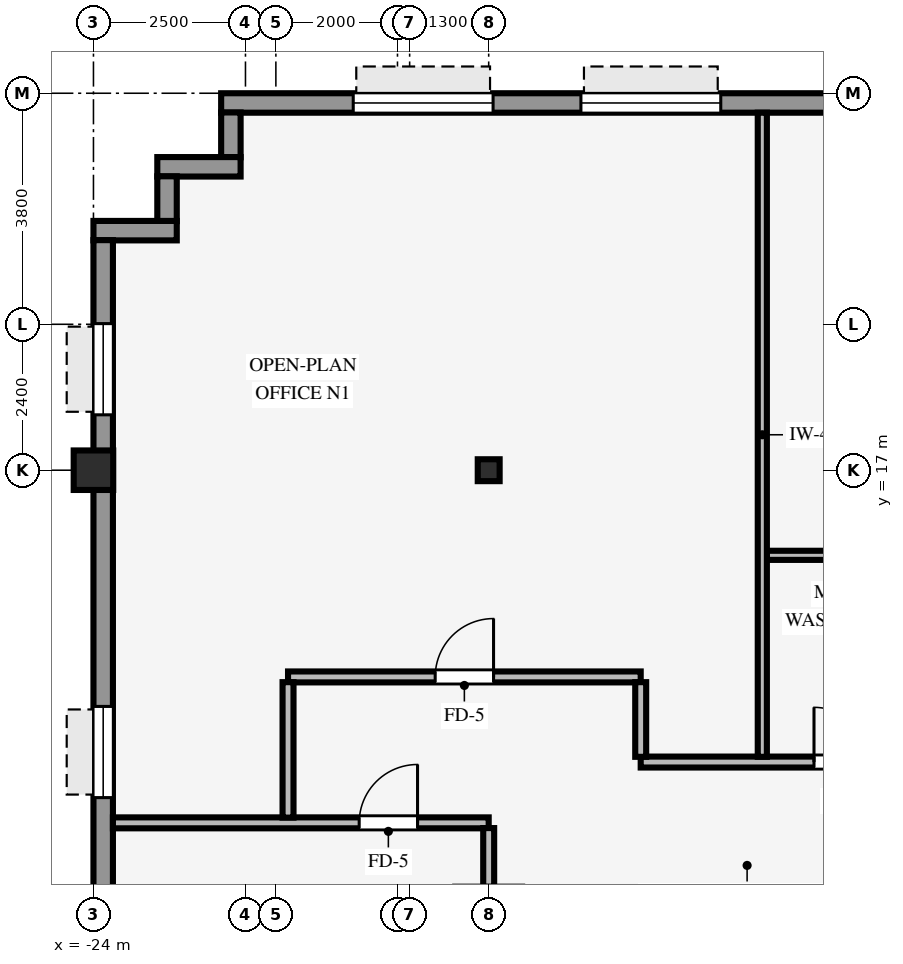
"""IFC4 building model, lengths in metres.
Left out: names, types, materials, properties, quantities, classifications, styles, units other than length and angle.
Written with IfcOpenShell. Run it as: python <this file> out.ifc"""

import sys

from ifc_helpers import new_model, si_unit, direction, frame, frame_2d, origin, origin_2d, place, context, subcontext, project, spatial, rectangle, hollow_rectangle, i_section, extrude, source, transform, mapped, element, fill, save


model = new_model("IFC4")
c1 = context("Model", 3, precision=1e-05, world=origin(), true_north=direction((0.0, 1.0)))
c2 = subcontext(c1, "Body", "Model", "MODEL_VIEW")
j1 = project(units=[si_unit("LENGTHUNIT", "METRE"), si_unit("PLANEANGLEUNIT", "RADIAN")], contexts=[c1])
p1 = place(None, origin())
s1 = spatial("IfcSite", under=j1, at=p1, CompositionType="ELEMENT")
p2 = place(p1, origin())
s2 = spatial("IfcBuilding", under=s1, at=p2, CompositionType="ELEMENT")
p3 = place(p2, frame((0.0, 0.0, 105.6)))
s3 = spatial("IfcBuildingStorey", under=s2, at=p3, CompositionType="ELEMENT", Elevation=105.6)
p4 = place(p3, frame((-24.0, 17.0, 0.0), z_axis=(0.0, 0.0, 1.0), x_axis=(1.0, 0.0, 0.0)))
e1 = element("IfcColumn", 1, at=p4, inside=s3, PredefinedType="COLUMN", context=c2, shape_type="SweptSolid", body=[
    extrude(hollow_rectangle(XDim=0.65, YDim=0.65, WallThickness=0.04, InnerFilletRadius=0.04, OuterFilletRadius=0.08, at=origin_2d()), origin(), (0.0, 0.0, 1.0), 3.37),
])
p5 = place(p3, frame((-17.5, 17.0, 0.0), z_axis=(0.0, 0.0, 1.0), x_axis=(1.0, 0.0, 0.0)))
e2 = element("IfcColumn", 2, at=p5, inside=s3, PredefinedType="COLUMN", context=c2, shape_type="SweptSolid", body=[
    extrude(i_section(OverallWidth=0.36, OverallDepth=0.36, WebThickness=0.021, FlangeThickness=0.021, FilletRadius=0.018, at=origin_2d()), origin(), (0.0, 0.0, 1.0), 3.37),
])
p6 = place(p3, frame((-21.9, 23.04, 0.0), z_axis=(0.0, 0.0, 1.0), x_axis=(1.0, 0.0, 0.0)))
e3 = element("IfcWall", 3, at=p6, inside=s3, PredefinedType="STANDARD", context=c2, shape_type="SweptSolid", body=[
    extrude(rectangle(XDim=43.8, YDim=0.32, at=frame_2d((21.9, 0.0))), origin(), (0.0, 0.0, 1.0), 2.705),
])
p7 = place(p6, frame((26.85, 0.0, 0.0)))
e4 = element("IfcOpeningElement", 4, at=p7, cuts=e3, PredefinedType="OPENING", context=c2, shape_type="SweptSolid", body=[
    extrude(rectangle(XDim=1.05, YDim=2.1, at=frame_2d((0.525, 1.05))), frame((0.0, 0.17, 0.0), z_axis=(0.0, -1.0, 0.0), x_axis=(1.0, 0.0, 0.0)), (0.0, 0.0, 1.0), 0.34),
])
p8 = place(p6, frame((2.172, 0.0, 0.8)))
e5 = element("IfcOpeningElement", 5, at=p8, cuts=e3, PredefinedType="OPENING", context=c2, shape_type="SweptSolid", body=[
    extrude(rectangle(XDim=2.3, YDim=1.62, at=frame_2d((1.15, 0.81))), frame((0.0, 0.17, 0.0), z_axis=(0.0, -1.0, 0.0), x_axis=(1.0, 0.0, 0.0)), (0.0, 0.0, 1.0), 0.34),
])
p9 = place(p6, frame((5.917, 0.0, 0.8)))
e6 = element("IfcOpeningElement", 6, at=p9, cuts=e3, PredefinedType="OPENING", context=c2, shape_type="SweptSolid", body=[
    extrude(rectangle(XDim=2.3, YDim=1.62, at=frame_2d((1.15, 0.81))), frame((0.0, 0.17, 0.0), z_axis=(0.0, -1.0, 0.0), x_axis=(1.0, 0.0, 0.0)), (0.0, 0.0, 1.0), 0.34),
])
p10 = place(p6, frame((16.106, 0.0, 0.8)))
e7 = element("IfcOpeningElement", 7, at=p10, cuts=e3, PredefinedType="OPENING", context=c2, shape_type="SweptSolid", body=[
    extrude(rectangle(XDim=2.3, YDim=1.62, at=frame_2d((1.15, 0.81))), frame((0.0, 0.17, 0.0), z_axis=(0.0, -1.0, 0.0), x_axis=(1.0, 0.0, 0.0)), (0.0, 0.0, 1.0), 0.34),
])
p11 = place(p6, frame((34.683, 0.0, 0.8)))
e8 = element("IfcOpeningElement", 8, at=p11, cuts=e3, PredefinedType="OPENING", context=c2, shape_type="SweptSolid", body=[
    extrude(rectangle(XDim=2.3, YDim=1.62, at=frame_2d((1.15, 0.81))), frame((0.0, 0.17, 0.0), z_axis=(0.0, -1.0, 0.0), x_axis=(1.0, 0.0, 0.0)), (0.0, 0.0, 1.0), 0.34),
])
p12 = place(p6, frame((39.328, 0.0, 0.8)))
e9 = element("IfcOpeningElement", 9, at=p12, cuts=e3, PredefinedType="OPENING", context=c2, shape_type="SweptSolid", body=[
    extrude(rectangle(XDim=2.3, YDim=1.62, at=frame_2d((1.15, 0.81))), frame((0.0, 0.17, 0.0), z_axis=(0.0, -1.0, 0.0), x_axis=(1.0, 0.0, 0.0)), (0.0, 0.0, 1.0), 0.34),
])
p13 = place(p3, frame((-21.74, 22.146, 0.0), z_axis=(0.0, 0.0, 1.0), x_axis=(0.0, 1.0, 0.0)))
e10 = element("IfcWall", 10, at=p13, inside=s3, PredefinedType="STANDARD", context=c2, shape_type="SweptSolid", body=[
    extrude(rectangle(XDim=0.738, YDim=0.32, at=frame_2d((0.369, 0.0))), origin(), (0.0, 0.0, 1.0), 3.36),
])
p14 = place(p3, frame((-22.95, 21.99, 0.0), z_axis=(0.0, 0.0, 1.0), x_axis=(1.0, 0.0, 0.0)))
e11 = element("IfcWall", 11, at=p14, inside=s3, PredefinedType="STANDARD", context=c2, shape_type="SweptSolid", body=[
    extrude(rectangle(XDim=1.37, YDim=0.32, at=frame_2d((0.685, 0.0))), origin(), (0.0, 0.0, 1.0), 3.36),
])
p15 = place(p3, frame((-22.79, 21.096, 0.0), z_axis=(0.0, 0.0, 1.0), x_axis=(0.0, 1.0, 0.0)))
e12 = element("IfcWall", 12, at=p15, inside=s3, PredefinedType="STANDARD", context=c2, shape_type="SweptSolid", body=[
    extrude(rectangle(XDim=0.738, YDim=0.32, at=frame_2d((0.369, 0.0))), origin(), (0.0, 0.0, 1.0), 3.36),
])
p16 = place(p3, frame((-24.0, 20.94, 0.0), z_axis=(0.0, 0.0, 1.0), x_axis=(1.0, 0.0, 0.0)))
e13 = element("IfcWall", 13, at=p16, inside=s3, PredefinedType="STANDARD", context=c2, shape_type="SweptSolid", body=[
    extrude(rectangle(XDim=1.37, YDim=0.32, at=frame_2d((0.685, 0.0))), origin(), (0.0, 0.0, 1.0), 3.36),
])
p17 = place(p3, frame((-23.84, -20.784, 0.0), z_axis=(0.0, 0.0, 1.0), x_axis=(0.0, 1.0, 0.0)))
e14 = element("IfcWall", 14, at=p17, inside=s3, PredefinedType="STANDARD", context=c2, shape_type="SweptSolid", body=[
    extrude(rectangle(XDim=41.568, YDim=0.32, at=frame_2d((20.784, 0.0))), origin(), (0.0, 0.0, 1.0), 2.705),
])
p18 = place(p17, frame((1.373, 0.0, 0.8)))
e15 = element("IfcOpeningElement", 15, at=p18, cuts=e14, PredefinedType="OPENING", context=c2, shape_type="SweptSolid", body=[
    extrude(rectangle(XDim=1.5, YDim=1.6, at=frame_2d((0.75, 0.8))), frame((0.0, 0.17, 0.0), z_axis=(0.0, -1.0, 0.0), x_axis=(1.0, 0.0, 0.0)), (0.0, 0.0, 1.0), 0.34),
])
p19 = place(p17, frame((7.669, 0.0, 0.8)))
e16 = element("IfcOpeningElement", 16, at=p19, cuts=e14, PredefinedType="OPENING", context=c2, shape_type="SweptSolid", body=[
    extrude(rectangle(XDim=1.5, YDim=1.6, at=frame_2d((0.75, 0.8))), frame((0.0, 0.17, 0.0), z_axis=(0.0, -1.0, 0.0), x_axis=(1.0, 0.0, 0.0)), (0.0, 0.0, 1.0), 0.34),
])
p20 = place(p17, frame((12.615, 0.0, 0.8)))
e17 = element("IfcOpeningElement", 17, at=p20, cuts=e14, PredefinedType="OPENING", context=c2, shape_type="SweptSolid", body=[
    extrude(rectangle(XDim=1.5, YDim=1.6, at=frame_2d((0.75, 0.8))), frame((0.0, 0.17, 0.0), z_axis=(0.0, -1.0, 0.0), x_axis=(1.0, 0.0, 0.0)), (0.0, 0.0, 1.0), 0.34),
])
p21 = place(p17, frame((17.561, 0.0, 0.8)))
e18 = element("IfcOpeningElement", 18, at=p21, cuts=e14, PredefinedType="OPENING", context=c2, shape_type="SweptSolid", body=[
    extrude(rectangle(XDim=1.5, YDim=1.6, at=frame_2d((0.75, 0.8))), frame((0.0, 0.17, 0.0), z_axis=(0.0, -1.0, 0.0), x_axis=(1.0, 0.0, 0.0)), (0.0, 0.0, 1.0), 0.34),
])
p22 = place(p17, frame((22.507, 0.0, 0.8)))
e19 = element("IfcOpeningElement", 19, at=p22, cuts=e14, PredefinedType="OPENING", context=c2, shape_type="SweptSolid", body=[
    extrude(rectangle(XDim=1.5, YDim=1.6, at=frame_2d((0.75, 0.8))), frame((0.0, 0.17, 0.0), z_axis=(0.0, -1.0, 0.0), x_axis=(1.0, 0.0, 0.0)), (0.0, 0.0, 1.0), 0.34),
])
p23 = place(p17, frame((27.453, 0.0, 0.8)))
e20 = element("IfcOpeningElement", 20, at=p23, cuts=e14, PredefinedType="OPENING", context=c2, shape_type="SweptSolid", body=[
    extrude(rectangle(XDim=1.5, YDim=1.6, at=frame_2d((0.75, 0.8))), frame((0.0, 0.17, 0.0), z_axis=(0.0, -1.0, 0.0), x_axis=(1.0, 0.0, 0.0)), (0.0, 0.0, 1.0), 0.34),
])
p24 = place(p17, frame((32.399, 0.0, 0.8)))
e21 = element("IfcOpeningElement", 21, at=p24, cuts=e14, PredefinedType="OPENING", context=c2, shape_type="SweptSolid", body=[
    extrude(rectangle(XDim=1.5, YDim=1.6, at=frame_2d((0.75, 0.8))), frame((0.0, 0.17, 0.0), z_axis=(0.0, -1.0, 0.0), x_axis=(1.0, 0.0, 0.0)), (0.0, 0.0, 1.0), 0.34),
])
p25 = place(p17, frame((38.695, 0.0, 0.8)))
e22 = element("IfcOpeningElement", 22, at=p25, cuts=e14, PredefinedType="OPENING", context=c2, shape_type="SweptSolid", body=[
    extrude(rectangle(XDim=1.5, YDim=1.6, at=frame_2d((0.75, 0.8))), frame((0.0, 0.17, 0.0), z_axis=(0.0, -1.0, 0.0), x_axis=(1.0, 0.0, 0.0)), (0.0, 0.0, 1.0), 0.34),
])
p26 = place(p3, frame((-23.68, 11.2, 0.0), z_axis=(0.0, 0.0, 1.0), x_axis=(1.0, 0.0, 0.0)))
e23 = element("IfcWall", 23, at=p26, inside=s3, PredefinedType="PARTITIONING", context=c2, shape_type="SweptSolid", body=[
    extrude(rectangle(XDim=6.18, YDim=0.18, at=frame_2d((3.09, 0.0))), origin(), (0.0, 0.0, 1.0), 3.36),
])
p27 = place(p26, frame((4.05, 0.0, 0.0)))
e24 = element("IfcOpeningElement", 24, at=p27, cuts=e23, PredefinedType="OPENING", context=c2, shape_type="SweptSolid", body=[
    extrude(rectangle(XDim=0.96, YDim=2.1, at=frame_2d((0.48, 1.05))), frame((0.0, 0.1, 0.0), z_axis=(0.0, -1.0, 0.0), x_axis=(1.0, 0.0, 0.0)), (0.0, 0.0, 1.0), 0.2),
])
p28 = place(p3, frame((-15.0, 12.2, 0.0), z_axis=(0.0, 0.0, 1.0), x_axis=(1.0, 0.0, 0.0)))
e25 = element("IfcWall", 25, at=p28, inside=s3, PredefinedType="PARTITIONING", context=c2, shape_type="SweptSolid", body=[
    extrude(rectangle(XDim=30.0, YDim=0.18, at=frame_2d((15.0, 0.0))), origin(), (0.0, 0.0, 1.0), 3.36),
])
p29 = place(p28, frame((23.02, 0.0, 0.0)))
e26 = element("IfcOpeningElement", 26, at=p29, cuts=e25, PredefinedType="OPENING", context=c2, shape_type="SweptSolid", body=[
    extrude(rectangle(XDim=0.96, YDim=2.1, at=frame_2d((0.48, 1.05))), frame((0.0, 0.1, 0.0), z_axis=(0.0, -1.0, 0.0), x_axis=(1.0, 0.0, 0.0)), (0.0, 0.0, 1.0), 0.2),
])
p30 = place(p28, frame((16.45, 0.0, 0.0)))
e27 = element("IfcOpeningElement", 27, at=p30, cuts=e25, PredefinedType="OPENING", context=c2, shape_type="SweptSolid", body=[
    extrude(rectangle(XDim=0.96, YDim=2.1, at=frame_2d((0.48, 1.05))), frame((0.0, 0.1, 0.0), z_axis=(0.0, -1.0, 0.0), x_axis=(1.0, 0.0, 0.0)), (0.0, 0.0, 1.0), 0.2),
])
p31 = place(p28, frame((5.45, 0.0, 0.0)))
e28 = element("IfcOpeningElement", 28, at=p31, cuts=e25, PredefinedType="OPENING", context=c2, shape_type="SweptSolid", body=[
    extrude(rectangle(XDim=0.9, YDim=2.1, at=frame_2d((0.45, 1.05))), frame((0.0, 0.1, 0.0), z_axis=(0.0, -1.0, 0.0), x_axis=(1.0, 0.0, 0.0)), (0.0, 0.0, 1.0), 0.2),
])
p32 = place(p28, frame((2.85, 0.0, 0.0)))
e29 = element("IfcOpeningElement", 29, at=p32, cuts=e25, PredefinedType="OPENING", context=c2, shape_type="SweptSolid", body=[
    extrude(rectangle(XDim=0.9, YDim=2.1, at=frame_2d((0.45, 1.05))), frame((0.0, 0.1, 0.0), z_axis=(0.0, -1.0, 0.0), x_axis=(1.0, 0.0, 0.0)), (0.0, 0.0, 1.0), 0.2),
])
p33 = place(p28, frame((12.52, 0.0, 0.0)))
e30 = element("IfcOpeningElement", 30, at=p33, cuts=e25, PredefinedType="OPENING", context=c2, shape_type="SweptSolid", body=[
    extrude(rectangle(XDim=0.96, YDim=2.1, at=frame_2d((0.48, 1.05))), frame((0.0, 0.1, 0.0), z_axis=(0.0, -1.0, 0.0), x_axis=(1.0, 0.0, 0.0)), (0.0, 0.0, 1.0), 0.2),
])
p34 = place(p28, frame((7.95, 0.0, 0.0)))
e31 = element("IfcOpeningElement", 31, at=p34, cuts=e25, PredefinedType="OPENING", context=c2, shape_type="SweptSolid", body=[
    extrude(rectangle(XDim=0.9, YDim=2.1, at=frame_2d((0.45, 1.05))), frame((0.0, 0.1, 0.0), z_axis=(0.0, -1.0, 0.0), x_axis=(1.0, 0.0, 0.0)), (0.0, 0.0, 1.0), 0.2),
])
p35 = place(p3, frame((-20.8, 13.6, 0.0), z_axis=(0.0, 0.0, 1.0), x_axis=(1.0, 0.0, 0.0)))
e32 = element("IfcWall", 32, at=p35, inside=s3, PredefinedType="PARTITIONING", context=c2, shape_type="SweptSolid", body=[
    extrude(rectangle(XDim=5.8, YDim=0.18, at=frame_2d((2.9, 0.0))), origin(), (0.0, 0.0, 1.0), 2.998),
])
p36 = place(p35, frame((2.42, 0.0, 0.0)))
e33 = element("IfcOpeningElement", 33, at=p36, cuts=e32, PredefinedType="OPENING", context=c2, shape_type="SweptSolid", body=[
    extrude(rectangle(XDim=0.96, YDim=2.1, at=frame_2d((0.48, 1.05))), frame((0.0, 0.1, 0.0), z_axis=(0.0, -1.0, 0.0), x_axis=(1.0, 0.0, 0.0)), (0.0, 0.0, 1.0), 0.2),
])
p37 = place(p3, frame((-12.929, 15.6, 0.0), z_axis=(0.0, 0.0, 1.0), x_axis=(1.0, 0.0, 0.0)))
e34 = element("IfcWall", 34, at=p37, inside=s3, PredefinedType="PARTITIONING", context=c2, shape_type="SweptSolid", body=[
    extrude(rectangle(XDim=7.529, YDim=0.15, at=frame_2d((3.765, 0.0))), origin(), (0.0, 0.0, 1.0), 3.36),
])
p38 = place(p3, frame((-20.8, 11.286, 0.0), z_axis=(0.0, 0.0, 1.0), x_axis=(0.0, 1.0, 0.0)))
e35 = element("IfcWall", 35, at=p38, inside=s3, PredefinedType="PARTITIONING", context=c2, shape_type="SweptSolid", body=[
    extrude(rectangle(XDim=2.228, YDim=0.18, at=frame_2d((1.114, 0.0))), origin(), (0.0, 0.0, 1.0), 3.36),
])
p39 = place(p3, frame((-17.5, 10.146, 0.0), z_axis=(0.0, 0.0, 1.0), x_axis=(0.0, 1.0, 0.0)))
e36 = element("IfcWall", 36, at=p39, inside=s3, PredefinedType="PARTITIONING", context=c2, shape_type="SweptSolid", body=[
    extrude(rectangle(XDim=0.968, YDim=0.18, at=frame_2d((0.484, 0.0))), origin(), (0.0, 0.0, 1.0), 2.738),
])
p40 = place(p3, frame((-15.0, 12.286, 0.0), z_axis=(0.0, 0.0, 1.0), x_axis=(0.0, 1.0, 0.0)))
e37 = element("IfcWall", 37, at=p40, inside=s3, PredefinedType="PARTITIONING", context=c2, shape_type="SweptSolid", body=[
    extrude(rectangle(XDim=1.228, YDim=0.18, at=frame_2d((0.614, 0.0))), origin(), (0.0, 0.0, 1.0), 3.36),
])
p41 = place(p3, frame((-13.0, 12.286, 0.0), z_axis=(0.0, 0.0, 1.0), x_axis=(0.0, 1.0, 0.0)))
e38 = element("IfcWall", 38, at=p41, inside=s3, PredefinedType="PARTITIONING", context=c2, shape_type="SweptSolid", body=[
    extrude(rectangle(XDim=10.594, YDim=0.15, at=frame_2d((5.297, 0.0))), origin(), (0.0, 0.0, 1.0), 3.36),
])
m1 = source(origin(), c2, "Body", "SweptSolid", [
    extrude(rectangle(XDim=2.3, YDim=1.62, at=frame_2d((1.15, 0.81))), frame((0.0, 0.03, 0.0), z_axis=(0.0, -1.0, 0.0), x_axis=(1.0, 0.0, 0.0)), (0.0, 0.0, 1.0), 0.06),
])
p42 = place(p8, origin())
e39 = element("IfcWindow", 39, at=p42, inside=s3, PartitioningType="SINGLE_PANEL", PredefinedType="WINDOW", context=c2, shape_type="MappedRepresentation", body=[
    mapped(m1, transform((0.0, 0.0, 0.0), scale=1.0)),
])
fill(e5, e39)
p43 = place(p9, origin())
e40 = element("IfcWindow", 40, at=p43, inside=s3, PartitioningType="SINGLE_PANEL", PredefinedType="WINDOW", context=c2, shape_type="MappedRepresentation", body=[
    mapped(m1, transform((0.0, 0.0, 0.0), scale=1.0)),
])
fill(e6, e40)
m2 = source(origin(), c2, "Body", "SweptSolid", [
    extrude(rectangle(XDim=1.5, YDim=1.6, at=frame_2d((0.75, 0.8))), frame((0.0, 0.03, 0.0), z_axis=(0.0, -1.0, 0.0), x_axis=(1.0, 0.0, 0.0)), (0.0, 0.0, 1.0), 0.06),
])
p44 = place(p24, origin())
e41 = element("IfcWindow", 41, at=p44, inside=s3, PartitioningType="SINGLE_PANEL", PredefinedType="WINDOW", context=c2, shape_type="MappedRepresentation", body=[
    mapped(m2, transform((0.0, 0.0, 0.0), scale=1.0)),
])
fill(e21, e41)
p45 = place(p25, origin())
e42 = element("IfcWindow", 42, at=p45, inside=s3, PartitioningType="SINGLE_PANEL", PredefinedType="WINDOW", context=c2, shape_type="MappedRepresentation", body=[
    mapped(m2, transform((0.0, 0.0, 0.0), scale=1.0)),
])
fill(e22, e42)
m3 = source(origin(), c2, "Body", "SweptSolid", [
    extrude(rectangle(XDim=0.96, YDim=2.1, at=frame_2d((0.48, 1.05))), frame((0.0, 0.025, 0.0), z_axis=(0.0, -1.0, 0.0), x_axis=(1.0, 0.0, 0.0)), (0.0, 0.0, 1.0), 0.05),
])
p46 = place(p36, origin())
e43 = element("IfcDoor", 43, at=p46, inside=s3, OperationType="SINGLE_SWING_RIGHT", PredefinedType="DOOR", context=c2, shape_type="MappedRepresentation", body=[
    mapped(m3, transform((0.0, 0.0, 0.0), scale=1.0)),
])
fill(e33, e43)
p47 = place(p27, origin())
e44 = element("IfcDoor", 44, at=p47, inside=s3, OperationType="SINGLE_SWING_RIGHT", PredefinedType="DOOR", context=c2, shape_type="MappedRepresentation", body=[
    mapped(m3, transform((0.0, 0.0, 0.0), scale=1.0)),
])
fill(e24, e44)
m4 = source(origin(), c2, "Body", "SweptSolid", [
    extrude(rectangle(XDim=0.9, YDim=2.1, at=frame_2d((0.45, 1.05))), frame((0.0, 0.025, 0.0), z_axis=(0.0, -1.0, 0.0), x_axis=(1.0, 0.0, 0.0)), (0.0, 0.0, 1.0), 0.05),
])
p48 = place(p32, origin())
e45 = element("IfcDoor", 45, at=p48, inside=s3, OperationType="SINGLE_SWING_LEFT", PredefinedType="DOOR", context=c2, shape_type="MappedRepresentation", body=[
    mapped(m4, transform((0.0, 0.0, 0.0), scale=1.0)),
])
fill(e29, e45)
save(model, sys.argv[1])
